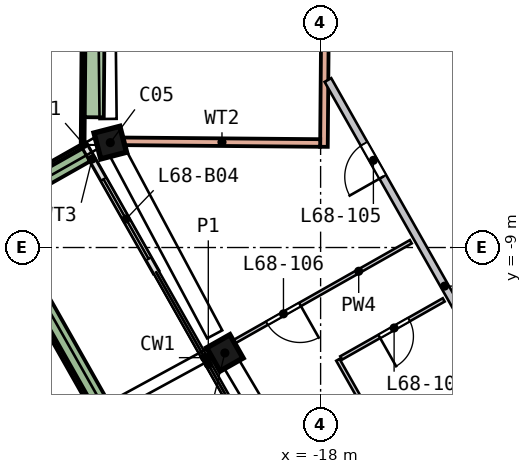
"""IFC4 building model, lengths in metres.
Left out: names, types, materials, properties, quantities, classifications, styles, units other than length and angle.
Written with IfcOpenShell. Run it as: python <this file> out.ifc"""

import sys

from ifc_helpers import new_model, si_unit, direction, frame, frame_2d, origin, origin_2d, place, context, subcontext, project, spatial, rectangle, extrude, element, fill, save


model = new_model("IFC4")
c1 = context("Model", 3, precision=1e-05, world=origin(), true_north=direction((0.0, 1.0)))
c2 = subcontext(c1, "Body", "Model", "MODEL_VIEW")
j1 = project(units=[si_unit("LENGTHUNIT", "METRE"), si_unit("PLANEANGLEUNIT", "RADIAN")], contexts=[c1])
p1 = place(None, origin())
s1 = spatial("IfcSite", under=j1, at=p1, CompositionType="ELEMENT")
p2 = place(p1, origin())
s2 = spatial("IfcBuilding", under=s1, at=p2, CompositionType="ELEMENT")
p3 = place(p2, frame((0.0, 0.0, 277.5)))
s3 = spatial("IfcBuildingStorey", under=s2, at=p3, CompositionType="ELEMENT", Elevation=277.5)
p4 = place(p3, frame((-23.57, -6.104, 0.0), z_axis=(0.029951852, -0.111825315, 0.993276389), x_axis=(-0.248830254, 0.961604099, 0.115762953)))
e1 = element("IfcColumn", 1, at=p4, inside=s3, PredefinedType="COLUMN", context=c2, shape_type="SweptSolid", body=[
    extrude(rectangle(XDim=0.7, YDim=0.7, at=origin_2d()), origin(), (0.0, 0.0, 1.0), 3.211),
])
p5 = place(p3, frame((-20.587, -11.657, 0.0), z_axis=(0.056275557, -0.097493601, 0.993643829), x_axis=(0.4894198, -0.864752693, -0.112565713)))
e2 = element("IfcColumn", 2, at=p5, inside=s3, PredefinedType="COLUMN", context=c2, shape_type="SweptSolid", body=[
    extrude(rectangle(XDim=0.7, YDim=0.7, at=origin_2d()), origin(), (0.0, 0.0, 1.0), 3.21),
])
p6 = place(p3, frame((-24.217, -6.312, 0.0), z_axis=(0.0, 0.0, 1.0), x_axis=(0.492706701, -0.870195442, 0.0)))
e3 = element("IfcWall", 3, at=p6, inside=s3, PredefinedType="SOLIDWALL", context=c2, shape_type="SweptSolid", body=[
    extrude(rectangle(XDim=3.827, YDim=0.15, at=frame_2d((1.914, 0.0))), origin(), (0.0, 0.0, 1.0), 2.525),
])
p7 = place(p6, frame((1.027, 0.0, 0.0)))
e4 = element("IfcOpeningElement", 4, at=p7, cuts=e3, PredefinedType="OPENING", context=c2, shape_type="SweptSolid", body=[
    extrude(rectangle(XDim=2.4, YDim=2.4, at=frame_2d((1.2, 1.2))), frame((0.0, 0.085, 0.0), z_axis=(0.0, -1.0, 0.0), x_axis=(1.0, 0.0, 0.0)), (0.0, 0.0, 1.0), 0.17),
])
p8 = place(p3, frame((-24.19, -6.515, 0.0), z_axis=(0.0, 0.0, 1.0), x_axis=(-0.870190179, -0.492715997, 0.0)))
e5 = element("IfcWall", 5, at=p8, inside=s3, PredefinedType="SOLIDWALL", context=c2, shape_type="SweptSolid", body=[
    extrude(rectangle(XDim=3.199, YDim=0.5, at=frame_2d((1.6, 0.0))), origin(), (0.0, 0.0, 1.0), 0.7),
])
p9 = place(p3, frame((-26.633, -8.185, 0.0), z_axis=(0.0, 0.0, 1.0), x_axis=(0.492731181, -0.870181581, 0.0)))
e6 = element("IfcWall", 6, at=p9, inside=s3, PredefinedType="SOLIDWALL", context=c2, shape_type="SweptSolid", body=[
    extrude(rectangle(XDim=13.223, YDim=0.5, at=frame_2d((6.612, 0.0))), origin(), (0.0, 0.0, 1.0), 0.7),
])
p10 = place(p3, frame((-17.912, -6.35, 0.0), z_axis=(0.0, 0.0, 1.0), x_axis=(0.008375922, 0.999964921, 0.0)))
e7 = element("IfcWall", 7, at=p10, inside=s3, PredefinedType="SOLIDWALL", context=c2, shape_type="SweptSolid", body=[
    extrude(rectangle(XDim=13.0, YDim=0.2, at=frame_2d((6.5, 0.0))), origin(), (0.0, 0.0, 1.0), 3.19),
])
p11 = place(p10, frame((5.6, 0.0, 0.0)))
e8 = element("IfcOpeningElement", 8, at=p11, cuts=e7, PredefinedType="OPENING", context=c2, shape_type="SweptSolid", body=[
    extrude(rectangle(XDim=1.8, YDim=2.4, at=frame_2d((0.9, 1.2))), frame((0.0, 0.11, 0.0), z_axis=(0.0, -1.0, 0.0), x_axis=(1.0, 0.0, 0.0)), (0.0, 0.0, 1.0), 0.22),
])
p12 = place(p3, frame((-23.179, -6.206, 0.0), z_axis=(0.0, 0.0, 1.0), x_axis=(0.999965043, -0.008361386, 0.0)))
e9 = element("IfcWall", 9, at=p12, inside=s3, PredefinedType="SOLIDWALL", context=c2, shape_type="SweptSolid", body=[
    extrude(rectangle(XDim=5.168, YDim=0.2, at=frame_2d((2.584, 0.0))), origin(), (0.0, 0.0, 1.0), 3.19),
])
p13 = place(p3, frame((-24.154, 6.623, 0.0), z_axis=(0.0, 0.0, 1.0), x_axis=(-0.008366158, -0.999965003, 0.0)))
e10 = element("IfcWall", 10, at=p13, inside=s3, PredefinedType="SOLIDWALL", context=c2, shape_type="SweptSolid", body=[
    extrude(rectangle(XDim=12.84, YDim=0.1, at=frame_2d((6.42, 0.0))), origin(), (0.0, 0.0, 1.0), 0.7),
])
p14 = place(p3, frame((-23.914, -0.611, 0.0), z_axis=(0.0, 0.0, 1.0), x_axis=(-0.008364614, -0.999965016, 0.0)))
e11 = element("IfcWall", 11, at=p14, inside=s3, PredefinedType="SOLIDWALL", context=c2, shape_type="SweptSolid", body=[
    extrude(rectangle(XDim=4.962, YDim=0.5, at=frame_2d((2.481, 0.0))), origin(), (0.0, 0.0, 1.0), 0.7),
])
p15 = place(p3, frame((-13.207, -12.717, 0.0), z_axis=(0.0, 0.0, 1.0), x_axis=(-0.492724884, 0.870185146, 0.0)))
e12 = element("IfcWall", 12, at=p15, inside=s3, PredefinedType="SOLIDWALL", context=c2, shape_type="SweptSolid", body=[
    extrude(rectangle(XDim=9.336, YDim=0.2, at=frame_2d((4.668, 0.0))), origin(), (0.0, 0.0, 1.0), 3.19),
])
p16 = place(p15, frame((6.408, 0.0, 0.0)))
e13 = element("IfcOpeningElement", 13, at=p16, cuts=e12, PredefinedType="OPENING", context=c2, shape_type="SweptSolid", body=[
    extrude(rectangle(XDim=1.0, YDim=2.1, at=frame_2d((0.5, 1.05))), frame((0.0, 0.11, 0.0), z_axis=(0.0, -1.0, 0.0), x_axis=(1.0, 0.0, 0.0)), (0.0, 0.0, 1.0), 0.22),
])
p17 = place(p3, frame((-15.627, -8.849, 0.0), z_axis=(0.0, 0.0, 1.0), x_axis=(-0.870190704, -0.492715069, 0.0)))
e14 = element("IfcWall", 14, at=p17, inside=s3, PredefinedType="PARTITIONING", context=c2, shape_type="SweptSolid", body=[
    extrude(rectangle(XDim=6.15, YDim=0.1, at=frame_2d((3.075, 0.0))), origin(), (0.0, 0.0, 1.0), 3.19),
])
p18 = place(p17, frame((3.35, 0.0, 0.0)))
e15 = element("IfcOpeningElement", 15, at=p18, cuts=e14, PredefinedType="OPENING", context=c2, shape_type="SweptSolid", body=[
    extrude(rectangle(XDim=1.0, YDim=2.1, at=frame_2d((0.5, 1.05))), frame((0.0, 0.06, 0.0), z_axis=(0.0, -1.0, 0.0), x_axis=(1.0, 0.0, 0.0)), (0.0, 0.0, 1.0), 0.12),
])
p19 = place(p3, frame((-17.545, -11.955, 0.0), z_axis=(0.0, 0.0, 1.0), x_axis=(0.492756443, -0.870167276, 0.0)))
e16 = element("IfcWall", 16, at=p19, inside=s3, PredefinedType="PARTITIONING", context=c2, shape_type="SweptSolid", body=[
    extrude(rectangle(XDim=3.704, YDim=0.1, at=frame_2d((1.852, 0.0))), origin(), (0.0, 0.0, 1.0), 3.19),
])
p20 = place(p3, frame((-14.761, -10.379, 0.0), z_axis=(0.0, 0.0, 1.0), x_axis=(-0.870194419, -0.492708506, 0.0)))
e17 = element("IfcWall", 17, at=p20, inside=s3, PredefinedType="PARTITIONING", context=c2, shape_type="SweptSolid", body=[
    extrude(rectangle(XDim=3.1, YDim=0.1, at=frame_2d((1.55, 0.0))), origin(), (0.0, 0.0, 1.0), 3.19),
])
p21 = place(p20, frame((1.05, 0.0, 0.0)))
e18 = element("IfcOpeningElement", 18, at=p21, cuts=e17, PredefinedType="OPENING", context=c2, shape_type="SweptSolid", body=[
    extrude(rectangle(XDim=0.9, YDim=2.1, at=frame_2d((0.45, 1.05))), frame((0.0, 0.06, 0.0), z_axis=(0.0, -1.0, 0.0), x_axis=(1.0, 0.0, 0.0)), (0.0, 0.0, 1.0), 0.12),
])
p22 = place(p7, origin())
e19 = element("IfcDoor", 19, at=p22, inside=s3, OperationType="SLIDING_TO_LEFT", PredefinedType="DOOR", context=c2, shape_type="SweptSolid", body=[
    extrude(rectangle(XDim=2.4, YDim=2.4, at=frame_2d((1.2, 1.2))), frame((0.0, 0.025, 0.0), z_axis=(0.0, -1.0, 0.0), x_axis=(1.0, 0.0, 0.0)), (0.0, 0.0, 1.0), 0.05),
])
fill(e4, e19)
p23 = place(p16, origin())
e20 = element("IfcDoor", 20, at=p23, inside=s3, OperationType="SINGLE_SWING_LEFT", PredefinedType="DOOR", context=c2, shape_type="SweptSolid", body=[
    extrude(rectangle(XDim=1.0, YDim=2.1, at=frame_2d((0.5, 1.05))), frame((0.0, 0.025, 0.0), z_axis=(0.0, -1.0, 0.0), x_axis=(1.0, 0.0, 0.0)), (0.0, 0.0, 1.0), 0.05),
])
fill(e13, e20)
p24 = place(p18, origin())
e21 = element("IfcDoor", 21, at=p24, inside=s3, OperationType="SINGLE_SWING_LEFT", PredefinedType="DOOR", context=c2, shape_type="SweptSolid", body=[
    extrude(rectangle(XDim=1.0, YDim=2.1, at=frame_2d((0.5, 1.05))), frame((0.0, 0.025, 0.0), z_axis=(0.0, -1.0, 0.0), x_axis=(1.0, 0.0, 0.0)), (0.0, 0.0, 1.0), 0.05),
])
fill(e15, e21)
p25 = place(p21, origin())
e22 = element("IfcDoor", 22, at=p25, inside=s3, OperationType="SINGLE_SWING_RIGHT", PredefinedType="DOOR", context=c2, shape_type="SweptSolid", body=[
    extrude(rectangle(XDim=0.9, YDim=2.1, at=frame_2d((0.45, 1.05))), frame((0.0, 0.025, 0.0), z_axis=(0.0, -1.0, 0.0), x_axis=(1.0, 0.0, 0.0)), (0.0, 0.0, 1.0), 0.05),
])
fill(e18, e22)
save(model, sys.argv[1])
